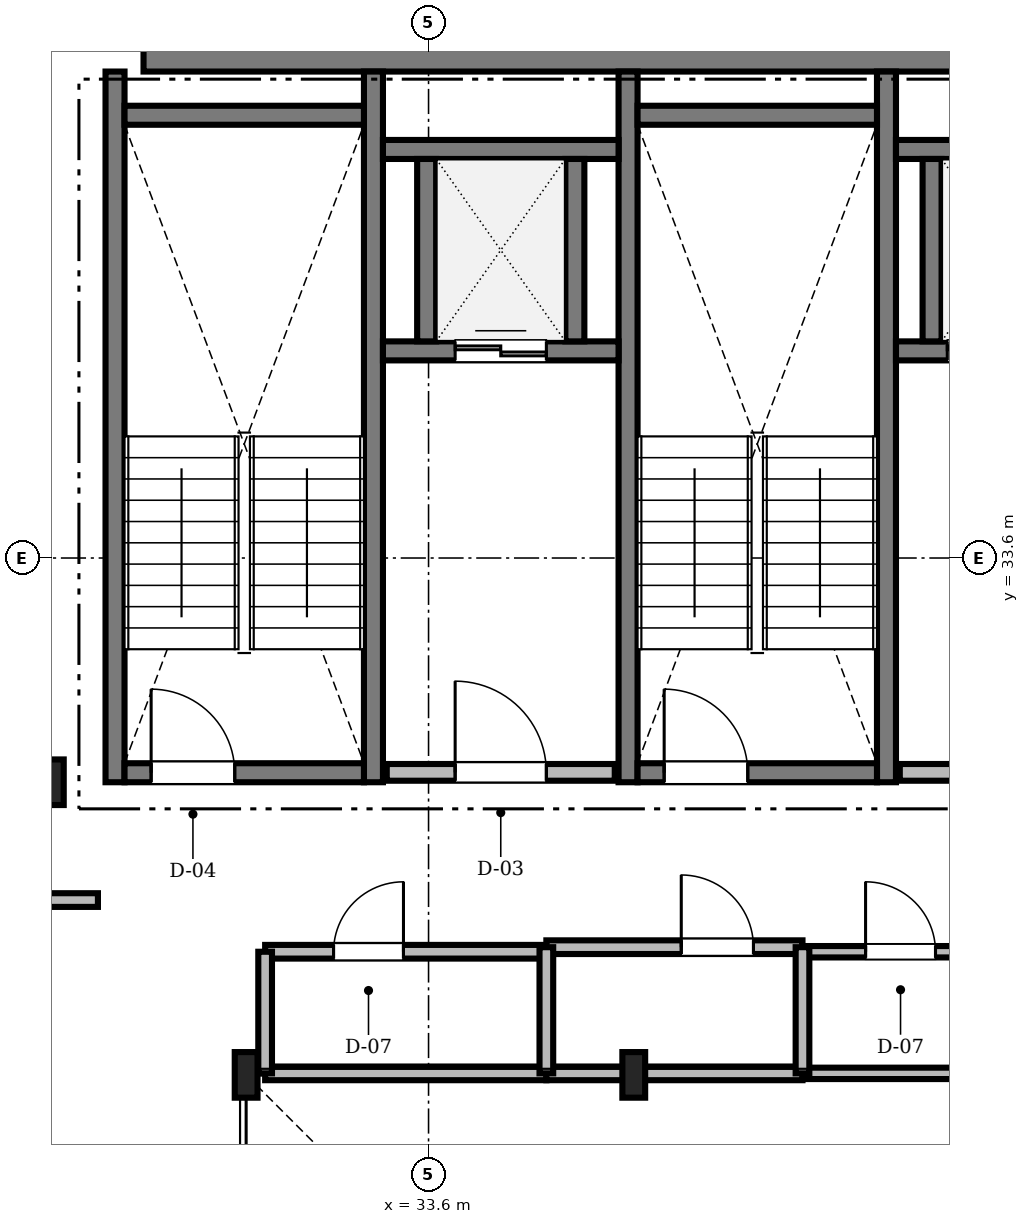
"""IFC4 building model, lengths in metres.
Left out: names, types, materials, properties, quantities, classifications, styles, units other than length and angle.
Written with IfcOpenShell. Run it as: python <this file> out.ifc"""

import sys

from ifc_helpers import new_model, si_unit, direction, frame, frame_2d, origin, origin_2d, place, context, subcontext, project, spatial, rectangle, i_section, extrude, source, transform, mapped, element, fill, save


model = new_model("IFC4")
c1 = context("Model", 3, precision=1e-05, world=origin(), true_north=direction((0.0, 1.0)))
c2 = subcontext(c1, "Body", "Model", "MODEL_VIEW")
j1 = project(units=[si_unit("LENGTHUNIT", "METRE"), si_unit("PLANEANGLEUNIT", "RADIAN")], contexts=[c1])
p1 = place(None, origin())
s1 = spatial("IfcSite", under=j1, at=p1, CompositionType="ELEMENT")
p2 = place(p1, origin())
s2 = spatial("IfcBuilding", under=s1, at=p2, CompositionType="ELEMENT")
p3 = place(p2, frame((0.0, 0.0, 278.25)))
s3 = spatial("IfcBuildingStorey", under=s2, at=p3, CompositionType="ELEMENT", Elevation=278.25)
m1 = source(origin(), c2, "Body", "SweptSolid", [
    extrude(rectangle(XDim=17.52, YDim=0.6, at=frame_2d((8.76, 0.0))), origin(), (0.0, 0.0, 1.0), 3.3),
])
p4 = place(p3, frame((29.85, 40.3, 0.0), z_axis=(0.0, 0.0, 1.0), x_axis=(1.0, 0.0, 0.0)))
e1 = element("IfcWall", 1, at=p4, inside=s3, PredefinedType="SHEAR", context=c2, shape_type="MappedRepresentation", body=[
    mapped(m1, transform((0.0, 0.0, 0.0), scale=1.0)),
])
m2 = source(origin(), c2, "Body", "SweptSolid", [
    extrude(i_section(OverallWidth=0.3, OverallDepth=0.6, WebThickness=0.015, FlangeThickness=0.03, FilletRadius=0.027, at=origin_2d()), origin(), (0.0, 0.0, 1.0), 3.3),
])
for number, where, z_axis, x_axis in (
    (2, (36.3, 26.8, 0.0), (0.0, 0.0, 1.0), (1.0, 0.0, 0.0)),
    (3, (31.2, 26.8, 0.0), (0.0, 0.0, 1.0), (1.0, 0.0, 0.0)),
    (4, (28.65, 30.65, 0.0), (0.0, 0.0, 1.0), (1.0, 0.0, 0.0)),
):
    element("IfcColumn", number, at=place(p3, frame(where, z_axis=z_axis, x_axis=x_axis)), inside=s3, PredefinedType="COLUMN", context=c2, shape_type="MappedRepresentation", body=[
        mapped(m2, transform((0.0, 0.0, 0.0), scale=1.0)),
    ])
m3 = source(origin(), c2, "Body", "SweptSolid", [
    extrude(rectangle(XDim=9.35, YDim=0.25, at=frame_2d((4.675, 0.0))), origin(), (0.0, 0.0, 1.0), 3.75),
])
for number, where, z_axis, x_axis in (
    (5, (29.475, 30.65, 0.0), (0.0, 0.0, 1.0), (0.0, 1.0, 0.0)),
    (6, (32.875, 30.65, 0.0), (0.0, 0.0, 1.0), (0.0, 1.0, 0.0)),
):
    element("IfcWall", number, at=place(p3, frame(where, z_axis=z_axis, x_axis=x_axis)), inside=s3, PredefinedType="SOLIDWALL", context=c2, shape_type="MappedRepresentation", body=[
        mapped(m3, transform((0.0, 0.0, 0.0), scale=1.0)),
    ])
m4 = source(origin(), c2, "Body", "SweptSolid", [
    extrude(rectangle(XDim=3.15, YDim=0.25, at=frame_2d((1.575, 0.0))), origin(), (0.0, 0.0, 1.0), 3.75),
])
p5 = place(p3, frame((29.6, 39.425, 0.0), z_axis=(0.0, 0.0, 1.0), x_axis=(1.0, 0.0, 0.0)))
e7 = element("IfcWall", 7, at=p5, inside=s3, PredefinedType="SOLIDWALL", context=c2, shape_type="MappedRepresentation", body=[
    mapped(m4, transform((0.0, 0.0, 0.0), scale=1.0)),
])
p6 = place(p3, frame((29.6, 30.775, 0.0), z_axis=(0.0, 0.0, 1.0), x_axis=(1.0, 0.0, 0.0)))
e8 = element("IfcWall", 8, at=p6, inside=s3, PredefinedType="SOLIDWALL", context=c2, shape_type="MappedRepresentation", body=[
    mapped(m4, transform((0.0, 0.0, 0.0), scale=1.0)),
])
m5 = source(origin(), c2, "Body", "SweptSolid", [
    extrude(rectangle(XDim=1.1, YDim=2.2, at=frame_2d((0.55, 1.1))), frame((0.0, 0.135, 0.0), z_axis=(0.0, -1.0, 0.0), x_axis=(1.0, 0.0, 0.0)), (0.0, 0.0, 1.0), 0.27),
])
p7 = place(p6, frame((0.35, 0.0, 0.0)))
e9 = element("IfcOpeningElement", 9, at=p7, cuts=e8, PredefinedType="OPENING", context=c2, shape_type="MappedRepresentation", body=[
    mapped(m5, transform((0.0, 0.0, 0.0), scale=1.0)),
])
for number, where, z_axis, x_axis in (
    (10, (36.225, 30.65, 0.0), (0.0, 0.0, 1.0), (0.0, 1.0, 0.0)),
    (11, (39.625, 30.65, 0.0), (0.0, 0.0, 1.0), (0.0, 1.0, 0.0)),
):
    element("IfcWall", number, at=place(p3, frame(where, z_axis=z_axis, x_axis=x_axis)), inside=s3, PredefinedType="SOLIDWALL", context=c2, shape_type="MappedRepresentation", body=[
        mapped(m3, transform((0.0, 0.0, 0.0), scale=1.0)),
    ])
p8 = place(p3, frame((36.35, 39.425, 0.0), z_axis=(0.0, 0.0, 1.0), x_axis=(1.0, 0.0, 0.0)))
e12 = element("IfcWall", 12, at=p8, inside=s3, PredefinedType="SOLIDWALL", context=c2, shape_type="MappedRepresentation", body=[
    mapped(m4, transform((0.0, 0.0, 0.0), scale=1.0)),
])
p9 = place(p3, frame((36.35, 30.775, 0.0), z_axis=(0.0, 0.0, 1.0), x_axis=(1.0, 0.0, 0.0)))
e13 = element("IfcWall", 13, at=p9, inside=s3, PredefinedType="SOLIDWALL", context=c2, shape_type="MappedRepresentation", body=[
    mapped(m4, transform((0.0, 0.0, 0.0), scale=1.0)),
])
p10 = place(p9, frame((0.35, 0.0, 0.0)))
e14 = element("IfcOpeningElement", 14, at=p10, cuts=e13, PredefinedType="OPENING", context=c2, shape_type="MappedRepresentation", body=[
    mapped(m5, transform((0.0, 0.0, 0.0), scale=1.0)),
])
m6 = source(origin(), c2, "Body", "SweptSolid", [
    extrude(rectangle(XDim=3.0, YDim=0.22, at=frame_2d((1.5, 0.0))), origin(), (0.0, 0.0, 1.0), 3.3),
])
p11 = place(p3, frame((33.05, 30.78, 0.0), z_axis=(0.0, 0.0, 1.0), x_axis=(1.0, 0.0, 0.0)))
e15 = element("IfcWall", 15, at=p11, inside=s3, PredefinedType="SOLIDWALL", context=c2, shape_type="MappedRepresentation", body=[
    mapped(m6, transform((0.0, 0.0, 0.0), scale=1.0)),
])
m7 = source(origin(), c2, "Body", "SweptSolid", [
    extrude(rectangle(XDim=1.2, YDim=2.2, at=frame_2d((0.6, 1.1))), frame((0.0, 0.12, 0.0), z_axis=(0.0, -1.0, 0.0), x_axis=(1.0, 0.0, 0.0)), (0.0, 0.0, 1.0), 0.24),
])
p12 = place(p11, frame((0.9, 0.0, 0.0)))
e16 = element("IfcOpeningElement", 16, at=p12, cuts=e15, PredefinedType="OPENING", context=c2, shape_type="MappedRepresentation", body=[
    mapped(m7, transform((0.0, 0.0, 0.0), scale=1.0)),
])
m8 = source(origin(), c2, "Body", "SweptSolid", [
    extrude(rectangle(XDim=2.8, YDim=0.22, at=frame_2d((1.4, 0.0))), origin(), (0.0, 0.0, 1.0), 3.3),
])
p13 = place(p3, frame((39.8, 30.78, 0.0), z_axis=(0.0, 0.0, 1.0), x_axis=(1.0, 0.0, 0.0)))
e17 = element("IfcWall", 17, at=p13, inside=s3, PredefinedType="SOLIDWALL", context=c2, shape_type="MappedRepresentation", body=[
    mapped(m8, transform((0.0, 0.0, 0.0), scale=1.0)),
])
p14 = place(p13, frame((0.8, 0.0, 0.0)))
e18 = element("IfcOpeningElement", 18, at=p14, cuts=e17, PredefinedType="OPENING", context=c2, shape_type="MappedRepresentation", body=[
    mapped(m7, transform((0.0, 0.0, 0.0), scale=1.0)),
])
m9 = source(origin(), c2, "Body", "SweptSolid", [
    extrude(rectangle(XDim=3.1, YDim=0.25, at=frame_2d((1.55, 0.0))), origin(), (0.0, 0.0, 1.0), 3.3),
])
p15 = place(p3, frame((33.0, 36.325, 0.0), z_axis=(0.0, 0.0, 1.0), x_axis=(1.0, 0.0, 0.0)))
e19 = element("IfcWall", 19, at=p15, inside=s3, PredefinedType="SOLIDWALL", context=c2, shape_type="MappedRepresentation", body=[
    mapped(m9, transform((0.0, 0.0, 0.0), scale=1.0)),
])
m10 = source(origin(), c2, "Body", "SweptSolid", [
    extrude(rectangle(XDim=1.2, YDim=2.25, at=frame_2d((0.6, 1.125))), frame((0.0, 0.135, 0.0), z_axis=(0.0, -1.0, 0.0), x_axis=(1.0, 0.0, 0.0)), (0.0, 0.0, 1.0), 0.27),
])
p16 = place(p15, frame((0.95, 0.0, 0.0)))
e20 = element("IfcOpeningElement", 20, at=p16, cuts=e19, PredefinedType="OPENING", context=c2, shape_type="MappedRepresentation", body=[
    mapped(m10, transform((0.0, 0.0, 0.0), scale=1.0)),
])
p17 = place(p3, frame((33.0, 38.975, 0.0), z_axis=(0.0, 0.0, 1.0), x_axis=(1.0, 0.0, 0.0)))
e21 = element("IfcWall", 21, at=p17, inside=s3, PredefinedType="SOLIDWALL", context=c2, shape_type="MappedRepresentation", body=[
    mapped(m9, transform((0.0, 0.0, 0.0), scale=1.0)),
])
m11 = source(origin(), c2, "Body", "SweptSolid", [
    extrude(rectangle(XDim=2.4, YDim=0.25, at=frame_2d((1.2, 0.0))), origin(), (0.0, 0.0, 1.0), 3.3),
])
for number, where, z_axis, x_axis in (
    (22, (33.575, 36.45, 0.0), (0.0, 0.0, 1.0), (0.0, 1.0, 0.0)),
    (23, (35.525, 36.45, 0.0), (0.0, 0.0, 1.0), (0.0, 1.0, 0.0)),
):
    element("IfcWall", number, at=place(p3, frame(where, z_axis=z_axis, x_axis=x_axis)), inside=s3, PredefinedType="SOLIDWALL", context=c2, shape_type="MappedRepresentation", body=[
        mapped(m11, transform((0.0, 0.0, 0.0), scale=1.0)),
    ])
m12 = source(origin(), c2, "Body", "SweptSolid", [
    extrude(rectangle(XDim=2.55, YDim=0.25, at=frame_2d((1.275, 0.0))), origin(), (0.0, 0.0, 1.0), 3.3),
])
p18 = place(p3, frame((39.75, 36.325, 0.0), z_axis=(0.0, 0.0, 1.0), x_axis=(1.0, 0.0, 0.0)))
e24 = element("IfcWall", 24, at=p18, inside=s3, PredefinedType="SOLIDWALL", context=c2, shape_type="MappedRepresentation", body=[
    mapped(m12, transform((0.0, 0.0, 0.0), scale=1.0)),
])
p19 = place(p18, frame((0.675, 0.0, 0.0)))
e25 = element("IfcOpeningElement", 25, at=p19, cuts=e24, PredefinedType="OPENING", context=c2, shape_type="MappedRepresentation", body=[
    mapped(m10, transform((0.0, 0.0, 0.0), scale=1.0)),
])
p20 = place(p3, frame((39.75, 38.975, 0.0), z_axis=(0.0, 0.0, 1.0), x_axis=(1.0, 0.0, 0.0)))
e26 = element("IfcWall", 26, at=p20, inside=s3, PredefinedType="SOLIDWALL", context=c2, shape_type="MappedRepresentation", body=[
    mapped(m12, transform((0.0, 0.0, 0.0), scale=1.0)),
])
p21 = place(p3, frame((40.225, 36.45, 0.0), z_axis=(0.0, 0.0, 1.0), x_axis=(0.0, 1.0, 0.0)))
e27 = element("IfcWall", 27, at=p21, inside=s3, PredefinedType="SOLIDWALL", context=c2, shape_type="MappedRepresentation", body=[
    mapped(m11, transform((0.0, 0.0, 0.0), scale=1.0)),
])
m13 = source(origin(), c2, "Body", "SweptSolid", [
    extrude(rectangle(XDim=10.088, YDim=0.18, at=frame_2d((5.044, 0.0))), origin(), (0.0, 0.0, 1.0), 2.08),
])
p22 = place(p3, frame((19.162, 29.1, 0.0), z_axis=(0.0, 0.0, 1.0), x_axis=(1.0, 0.0, 0.0)))
e28 = element("IfcWall", 28, at=p22, inside=s3, PredefinedType="PARTITIONING", context=c2, shape_type="MappedRepresentation", body=[
    mapped(m13, transform((0.0, 0.0, 0.0), scale=1.0)),
])
m14 = source(origin(), c2, "Body", "SweptSolid", [
    extrude(rectangle(XDim=1.05, YDim=2.2, at=frame_2d((0.525, 1.1))), frame((0.0, 0.1, 0.0), z_axis=(0.0, -1.0, 0.0), x_axis=(1.0, 0.0, 0.0)), (0.0, 0.0, 1.0), 0.2),
])
p23 = place(p22, frame((6.998, 0.0, 0.0)))
e29 = element("IfcOpeningElement", 29, at=p23, cuts=e28, PredefinedType="OPENING", context=c2, shape_type="MappedRepresentation", body=[
    mapped(m14, transform((0.0, 0.0, 0.0), scale=1.0)),
])
m15 = source(origin(), c2, "Body", "SweptSolid", [
    extrude(rectangle(XDim=3.7, YDim=0.18, at=frame_2d((1.85, 0.0))), origin(), (0.0, 0.0, 1.0), 2.932),
])
p24 = place(p3, frame((31.45, 28.42, 0.0), z_axis=(0.0, 0.0, 1.0), x_axis=(1.0, 0.0, 0.0)))
e30 = element("IfcWall", 30, at=p24, inside=s3, PredefinedType="PARTITIONING", context=c2, shape_type="MappedRepresentation", body=[
    mapped(m15, transform((0.0, 0.0, 0.0), scale=1.0)),
])
m16 = source(origin(), c2, "Body", "SweptSolid", [
    extrude(rectangle(XDim=0.92, YDim=2.1, at=frame_2d((0.46, 1.05))), frame((0.0, 0.1, 0.0), z_axis=(0.0, -1.0, 0.0), x_axis=(1.0, 0.0, 0.0)), (0.0, 0.0, 1.0), 0.2),
])
p25 = place(p24, frame((0.9, 0.0, 0.0)))
e31 = element("IfcOpeningElement", 31, at=p25, cuts=e30, PredefinedType="OPENING", context=c2, shape_type="MappedRepresentation", body=[
    mapped(m16, transform((0.0, 0.0, 0.0), scale=1.0)),
])
m17 = source(origin(), c2, "Body", "SweptSolid", [
    extrude(rectangle(XDim=3.37, YDim=0.18, at=frame_2d((1.685, 0.0))), origin(), (0.0, 0.0, 1.0), 3.3),
])
p26 = place(p3, frame((35.15, 28.48, 0.0), z_axis=(0.0, 0.0, 1.0), x_axis=(1.0, 0.0, 0.0)))
e32 = element("IfcWall", 32, at=p26, inside=s3, PredefinedType="PARTITIONING", context=c2, shape_type="MappedRepresentation", body=[
    mapped(m17, transform((0.0, 0.0, 0.0), scale=1.0)),
])
m18 = source(origin(), c2, "Body", "SweptSolid", [
    extrude(rectangle(XDim=0.95, YDim=2.15, at=frame_2d((0.475, 1.075))), frame((0.0, 0.1, 0.0), z_axis=(0.0, -1.0, 0.0), x_axis=(1.0, 0.0, 0.0)), (0.0, 0.0, 1.0), 0.2),
])
p27 = place(p26, frame((1.775, 0.0, 0.0)))
e33 = element("IfcOpeningElement", 33, at=p27, cuts=e32, PredefinedType="OPENING", context=c2, shape_type="MappedRepresentation", body=[
    mapped(m18, transform((0.0, 0.0, 0.0), scale=1.0)),
])
m19 = source(origin(), c2, "Body", "SweptSolid", [
    extrude(rectangle(XDim=3.0, YDim=0.15, at=frame_2d((1.5, 0.0))), origin(), (0.0, 0.0, 1.0), 3.3),
])
p28 = place(p3, frame((38.52, 28.42, 0.0), z_axis=(0.0, 0.0, 1.0), x_axis=(1.0, 0.0, 0.0)))
e34 = element("IfcWall", 34, at=p28, inside=s3, PredefinedType="PARTITIONING", context=c2, shape_type="MappedRepresentation", body=[
    mapped(m19, transform((0.0, 0.0, 0.0), scale=1.0)),
])
m20 = source(origin(), c2, "Body", "SweptSolid", [
    extrude(rectangle(XDim=0.92, YDim=2.1, at=frame_2d((0.46, 1.05))), frame((0.0, 0.085, 0.0), z_axis=(0.0, -1.0, 0.0), x_axis=(1.0, 0.0, 0.0)), (0.0, 0.0, 1.0), 0.17),
])
p29 = place(p28, frame((0.83, 0.0, 0.0)))
e35 = element("IfcOpeningElement", 35, at=p29, cuts=e34, PredefinedType="OPENING", context=c2, shape_type="MappedRepresentation", body=[
    mapped(m20, transform((0.0, 0.0, 0.0), scale=1.0)),
])
m21 = source(origin(), c2, "Body", "SweptSolid", [
    extrude(rectangle(XDim=3.7, YDim=0.18, at=frame_2d((1.85, 0.0))), origin(), (0.0, 0.0, 1.0), 2.842),
])
p30 = place(p3, frame((31.45, 26.82, 0.0), z_axis=(0.0, 0.0, 1.0), x_axis=(1.0, 0.0, 0.0)))
e36 = element("IfcWall", 36, at=p30, inside=s3, PredefinedType="PARTITIONING", context=c2, shape_type="MappedRepresentation", body=[
    mapped(m21, transform((0.0, 0.0, 0.0), scale=1.0)),
])
m22 = source(origin(), c2, "Body", "SweptSolid", [
    extrude(rectangle(XDim=3.37, YDim=0.18, at=frame_2d((1.685, 0.0))), origin(), (0.0, 0.0, 1.0), 2.842),
])
p31 = place(p3, frame((35.15, 26.82, 0.0), z_axis=(0.0, 0.0, 1.0), x_axis=(1.0, 0.0, 0.0)))
e37 = element("IfcWall", 37, at=p31, inside=s3, PredefinedType="PARTITIONING", context=c2, shape_type="MappedRepresentation", body=[
    mapped(m22, transform((0.0, 0.0, 0.0), scale=1.0)),
])
m23 = source(origin(), c2, "Body", "SweptSolid", [
    extrude(rectangle(XDim=3.0, YDim=0.15, at=frame_2d((1.5, 0.0))), origin(), (0.0, 0.0, 1.0), 2.842),
])
p32 = place(p3, frame((38.52, 26.82, 0.0), z_axis=(0.0, 0.0, 1.0), x_axis=(1.0, 0.0, 0.0)))
e38 = element("IfcWall", 38, at=p32, inside=s3, PredefinedType="PARTITIONING", context=c2, shape_type="MappedRepresentation", body=[
    mapped(m23, transform((0.0, 0.0, 0.0), scale=1.0)),
])
m24 = source(origin(), c2, "Body", "SweptSolid", [
    extrude(rectangle(XDim=1.66, YDim=0.18, at=frame_2d((0.83, 0.0))), origin(), (0.0, 0.0, 1.0), 2.842),
])
for number, where, z_axis, x_axis in (
    (39, (35.15, 26.82, 0.0), (0.0, 0.0, 1.0), (0.0, 1.0, 0.0)),
    (40, (38.52, 26.82, 0.0), (0.0, 0.0, 1.0), (0.0, 1.0, 0.0)),
):
    element("IfcWall", number, at=place(p3, frame(where, z_axis=z_axis, x_axis=x_axis)), inside=s3, PredefinedType="PARTITIONING", context=c2, shape_type="MappedRepresentation", body=[
        mapped(m24, transform((0.0, 0.0, 0.0), scale=1.0)),
    ])
m25 = source(origin(), c2, "Body", "SweptSolid", [
    extrude(rectangle(XDim=1.6, YDim=0.18, at=frame_2d((0.8, 0.0))), origin(), (0.0, 0.0, 1.0), 2.842),
])
p33 = place(p3, frame((31.45, 26.82, 0.0), z_axis=(0.0, 0.0, 1.0), x_axis=(0.0, 1.0, 0.0)))
e41 = element("IfcWall", 41, at=p33, inside=s3, PredefinedType="PARTITIONING", context=c2, shape_type="MappedRepresentation", body=[
    mapped(m25, transform((0.0, 0.0, 0.0), scale=1.0)),
])
m26 = source(origin(), c2, "Body", "SweptSolid", [
    extrude(rectangle(XDim=1.1, YDim=2.2, at=frame_2d((0.55, 1.1))), frame((0.0, 0.025, 0.0), z_axis=(0.0, -1.0, 0.0), x_axis=(1.0, 0.0, 0.0)), (0.0, 0.0, 1.0), 0.05),
])
p34 = place(p7, origin())
e42 = element("IfcDoor", 42, at=p34, inside=s3, OperationType="SINGLE_SWING_LEFT", PredefinedType="DOOR", context=c2, shape_type="MappedRepresentation", body=[
    mapped(m26, transform((0.0, 0.0, 0.0), scale=1.0)),
])
fill(e9, e42)
p35 = place(p10, origin())
e43 = element("IfcDoor", 43, at=p35, inside=s3, OperationType="SINGLE_SWING_LEFT", PredefinedType="DOOR", context=c2, shape_type="MappedRepresentation", body=[
    mapped(m26, transform((0.0, 0.0, 0.0), scale=1.0)),
])
fill(e14, e43)
m27 = source(origin(), c2, "Body", "SweptSolid", [
    extrude(rectangle(XDim=1.2, YDim=2.2, at=frame_2d((0.6, 1.1))), frame((0.0, 0.025, 0.0), z_axis=(0.0, -1.0, 0.0), x_axis=(1.0, 0.0, 0.0)), (0.0, 0.0, 1.0), 0.05),
])
p36 = place(p12, origin())
e44 = element("IfcDoor", 44, at=p36, inside=s3, OperationType="SINGLE_SWING_LEFT", PredefinedType="DOOR", context=c2, shape_type="MappedRepresentation", body=[
    mapped(m27, transform((0.0, 0.0, 0.0), scale=1.0)),
])
fill(e16, e44)
m28 = source(origin(), c2, "Body", "SweptSolid", [
    extrude(rectangle(XDim=1.2, YDim=2.25, at=frame_2d((0.6, 1.125))), frame((0.0, 0.025, 0.0), z_axis=(0.0, -1.0, 0.0), x_axis=(1.0, 0.0, 0.0)), (0.0, 0.0, 1.0), 0.05),
])
p37 = place(p16, origin())
e45 = element("IfcDoor", 45, at=p37, inside=s3, OperationType="DOUBLE_DOOR_SLIDING", PredefinedType="DOOR", context=c2, shape_type="MappedRepresentation", body=[
    mapped(m28, transform((0.0, 0.0, 0.0), scale=1.0)),
])
fill(e20, e45)
p38 = place(p19, origin())
e46 = element("IfcDoor", 46, at=p38, inside=s3, OperationType="DOUBLE_DOOR_SLIDING", PredefinedType="DOOR", context=c2, shape_type="MappedRepresentation", body=[
    mapped(m28, transform((0.0, 0.0, 0.0), scale=1.0)),
])
fill(e25, e46)
m29 = source(origin(), c2, "Body", "SweptSolid", [
    extrude(rectangle(XDim=0.92, YDim=2.1, at=frame_2d((0.46, 1.05))), frame((0.0, 0.025, 0.0), z_axis=(0.0, -1.0, 0.0), x_axis=(1.0, 0.0, 0.0)), (0.0, 0.0, 1.0), 0.05),
])
p39 = place(p25, origin())
e47 = element("IfcDoor", 47, at=p39, inside=s3, OperationType="SINGLE_SWING_RIGHT", PredefinedType="DOOR", context=c2, shape_type="MappedRepresentation", body=[
    mapped(m29, transform((0.0, 0.0, 0.0), scale=1.0)),
])
fill(e31, e47)
m30 = source(origin(), c2, "Body", "SweptSolid", [
    extrude(rectangle(XDim=0.95, YDim=2.15, at=frame_2d((0.475, 1.075))), frame((0.0, 0.025, 0.0), z_axis=(0.0, -1.0, 0.0), x_axis=(1.0, 0.0, 0.0)), (0.0, 0.0, 1.0), 0.05),
])
p40 = place(p27, origin())
e48 = element("IfcDoor", 48, at=p40, inside=s3, OperationType="SINGLE_SWING_LEFT", PredefinedType="DOOR", context=c2, shape_type="MappedRepresentation", body=[
    mapped(m30, transform((0.0, 0.0, 0.0), scale=1.0)),
])
fill(e33, e48)
p41 = place(p29, origin())
e49 = element("IfcDoor", 49, at=p41, inside=s3, OperationType="SINGLE_SWING_LEFT", PredefinedType="DOOR", context=c2, shape_type="MappedRepresentation", body=[
    mapped(m29, transform((0.0, 0.0, 0.0), scale=1.0)),
])
fill(e35, e49)
save(model, sys.argv[1])
